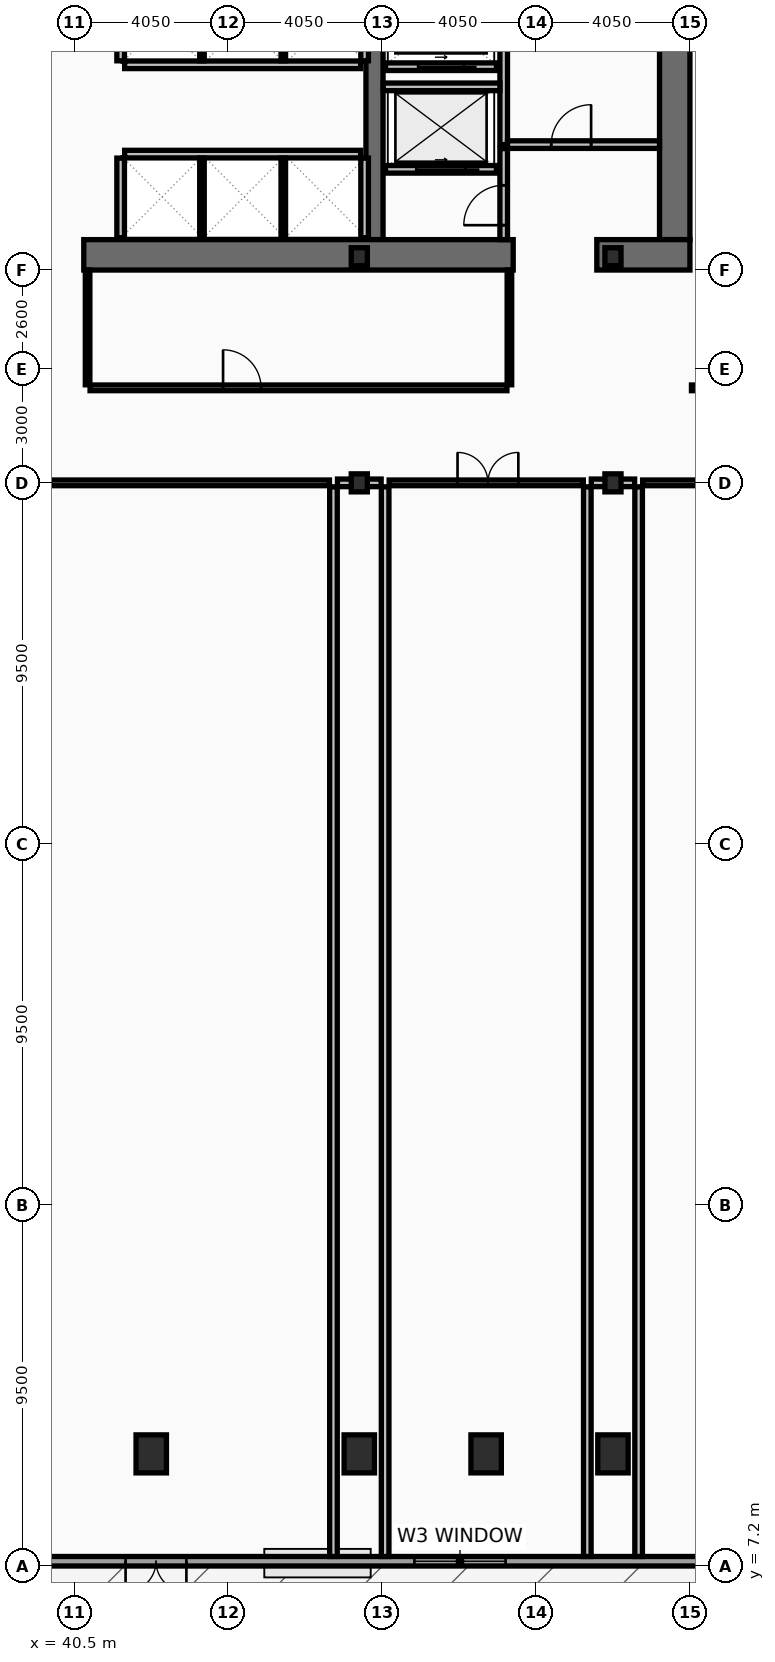
"""IFC4 building model, lengths in metres.
Left out: names, types, materials, properties, quantities, classifications, styles, units other than length and angle.
Written with IfcOpenShell. Run it as: python <this file> out.ifc"""

import sys

from ifc_helpers import new_model, si_unit, direction, frame, frame_2d, origin, origin_2d, place, context, subcontext, project, spatial, rectangle, hollow_rectangle, i_section, extrude, element, fill, save


model = new_model("IFC4")
c1 = context("Model", 3, precision=1e-05, world=origin(), true_north=direction((0.0, 1.0)))
c2 = subcontext(c1, "Body", "Model", "MODEL_VIEW")
j1 = project(units=[si_unit("LENGTHUNIT", "METRE"), si_unit("PLANEANGLEUNIT", "RADIAN")], contexts=[c1])
p1 = place(None, origin())
s1 = spatial("IfcSite", under=j1, at=p1, CompositionType="ELEMENT")
p2 = place(p1, origin())
s2 = spatial("IfcBuilding", under=s1, at=p2, CompositionType="ELEMENT")
p3 = place(p2, frame((0.0, 0.0, 20.4)))
s3 = spatial("IfcBuildingStorey", under=s2, at=p3, CompositionType="ELEMENT", Elevation=20.4)
p4 = place(p3, frame((56.3, 52.9, 0.0), z_axis=(0.0, 0.0, 1.0), x_axis=(0.0, -1.0, 0.0)))
e1 = element("IfcWall", 1, at=p4, inside=s3, PredefinedType="SHEAR", context=c2, shape_type="SweptSolid", body=[
    extrude(rectangle(XDim=10.8, YDim=0.8, at=frame_2d((5.4, 0.0))), origin(), (0.0, 0.0, 1.0), 5.22),
])
p5 = place(p3, frame((48.4, 42.1, 0.0), z_axis=(0.0, 0.0, 1.0), x_axis=(0.0, 1.0, 0.0)))
e2 = element("IfcWall", 2, at=p5, inside=s3, PredefinedType="SHEAR", context=c2, shape_type="SweptSolid", body=[
    extrude(rectangle(XDim=10.8, YDim=0.45, at=frame_2d((5.4, 0.0))), origin(), (0.0, 0.0, 1.0), 5.22),
])
p6 = place(p3, frame((52.05, 41.7, 0.0), z_axis=(0.0, 0.0, 1.0), x_axis=(-1.0, 0.0, 0.0)))
e3 = element("IfcWall", 3, at=p6, inside=s3, PredefinedType="SHEAR", context=c2, shape_type="SweptSolid", body=[
    extrude(rectangle(XDim=11.3, YDim=0.8, at=frame_2d((5.65, 0.0))), origin(), (0.0, 0.0, 1.0), 5.22),
])
p7 = place(p3, frame((56.7, 41.7, 0.0), z_axis=(0.0, 0.0, 1.0), x_axis=(-1.0, 0.0, 0.0)))
e4 = element("IfcWall", 4, at=p7, inside=s3, PredefinedType="SHEAR", context=c2, shape_type="SweptSolid", body=[
    extrude(rectangle(XDim=2.45, YDim=0.8, at=frame_2d((1.225, 0.0))), origin(), (0.0, 0.0, 1.0), 5.22),
])
for number, where, z_axis, x_axis in (
    (5, (42.525, 10.15, 0.0), (0.0, 0.0, 1.0), (1.0, 0.0, 0.0)),
    (6, (48.0, 10.15, 0.0), (0.0, 0.0, 1.0), (1.0, 0.0, 0.0)),
    (7, (51.337, 10.15, 0.0), (0.0, 0.0, 1.0), (1.0, 0.0, 0.0)),
    (8, (54.675, 10.15, 0.0), (0.0, 0.0, 1.0), (1.0, 0.0, 0.0)),
):
    element("IfcColumn", number, at=place(p3, frame(where, z_axis=z_axis, x_axis=x_axis)), inside=s3, PredefinedType="COLUMN", context=c2, shape_type="SweptSolid", body=[
        extrude(hollow_rectangle(XDim=0.8, YDim=1.0, WallThickness=0.055, at=origin_2d()), origin(), (0.0, 0.0, 1.0), 5.4),
    ])
for number, where, z_axis, x_axis in (
    (9, (48.0, 35.7, 0.0), (0.0, 0.0, 1.0), (1.0, 0.0, 0.0)),
    (10, (48.0, 41.65, 0.0), (0.0, 0.0, 1.0), (1.0, 0.0, 0.0)),
    (11, (54.675, 35.7, 0.0), (0.0, 0.0, 1.0), (1.0, 0.0, 0.0)),
    (12, (54.675, 41.65, 0.0), (0.0, 0.0, 1.0), (1.0, 0.0, 0.0)),
):
    element("IfcColumn", number, at=place(p3, frame(where, z_axis=z_axis, x_axis=x_axis)), inside=s3, PredefinedType="COLUMN", context=c2, shape_type="SweptSolid", body=[
        extrude(i_section(OverallWidth=0.424, OverallDepth=0.474, WebThickness=0.048, FlangeThickness=0.077, at=origin_2d()), origin(), (0.0, 0.0, 1.0), 5.4),
    ])
p8 = place(p3, frame((72.9, 7.325, 0.0), z_axis=(0.0, 0.0, 1.0), x_axis=(-1.0, 0.0, 0.0)))
e13 = element("IfcWall", 13, at=p8, inside=s3, PredefinedType="SOLIDWALL", context=c2, shape_type="SweptSolid", body=[
    extrude(rectangle(XDim=72.9, YDim=0.25, at=frame_2d((36.45, 0.0))), origin(), (0.0, 0.0, 1.0), 4.56),
])
p9 = place(p8, frame((10.45, 0.0, 0.0)))
e14 = element("IfcOpeningElement", 14, at=p9, cuts=e13, PredefinedType="OPENING", context=c2, shape_type="SweptSolid", body=[
    extrude(rectangle(XDim=1.6, YDim=2.2, at=frame_2d((0.8, 1.1))), frame((0.0, 0.135, 0.0), z_axis=(0.0, -1.0, 0.0), x_axis=(1.0, 0.0, 0.0)), (0.0, 0.0, 1.0), 0.27),
])
p10 = place(p8, frame((29.45, 0.0, 0.0)))
e15 = element("IfcOpeningElement", 15, at=p10, cuts=e13, PredefinedType="OPENING", context=c2, shape_type="SweptSolid", body=[
    extrude(rectangle(XDim=1.6, YDim=2.2, at=frame_2d((0.8, 1.1))), frame((0.0, 0.135, 0.0), z_axis=(0.0, -1.0, 0.0), x_axis=(1.0, 0.0, 0.0)), (0.0, 0.0, 1.0), 0.27),
])
p11 = place(p8, frame((60.65, 0.0, 0.0)))
e16 = element("IfcOpeningElement", 16, at=p11, cuts=e13, PredefinedType="OPENING", context=c2, shape_type="SweptSolid", body=[
    extrude(rectangle(XDim=1.05, YDim=2.15, at=frame_2d((0.525, 1.075))), frame((0.0, 0.135, 0.0), z_axis=(0.0, -1.0, 0.0), x_axis=(1.0, 0.0, 0.0)), (0.0, 0.0, 1.0), 0.27),
])
p12 = place(p8, frame((21.05, 0.0, 0.85)))
e17 = element("IfcOpeningElement", 17, at=p12, cuts=e13, PredefinedType="OPENING", context=c2, shape_type="SweptSolid", body=[
    extrude(rectangle(XDim=2.4, YDim=2.6, at=frame_2d((1.2, 1.3))), frame((0.0, 0.135, 0.0), z_axis=(0.0, -1.0, 0.0), x_axis=(1.0, 0.0, 0.0)), (0.0, 0.0, 1.0), 0.27),
])
p13 = place(p8, frame((49.65, 0.0, 0.85)))
e18 = element("IfcOpeningElement", 18, at=p13, cuts=e13, PredefinedType="OPENING", context=c2, shape_type="SweptSolid", body=[
    extrude(rectangle(XDim=2.4, YDim=2.6, at=frame_2d((1.2, 1.3))), frame((0.0, 0.135, 0.0), z_axis=(0.0, -1.0, 0.0), x_axis=(1.0, 0.0, 0.0)), (0.0, 0.0, 1.0), 0.27),
])
p14 = place(p3, frame((51.61, 43.95, 0.0), z_axis=(0.0, 0.0, 1.0), x_axis=(-1.0, 0.0, 0.0)))
e19 = element("IfcWall", 19, at=p14, inside=s3, PredefinedType="PARTITIONING", context=c2, shape_type="SweptSolid", body=[
    extrude(rectangle(XDim=2.92, YDim=0.2, at=frame_2d((1.46, 0.0))), origin(), (0.0, 0.0, 1.0), 5.22),
])
p15 = place(p14, frame((0.81, 0.0, 0.0)))
e20 = element("IfcOpeningElement", 20, at=p15, cuts=e19, PredefinedType="OPENING", context=c2, shape_type="SweptSolid", body=[
    extrude(rectangle(XDim=1.3, YDim=2.18, at=frame_2d((0.65, 1.09))), frame((0.0, 0.11, 0.0), z_axis=(0.0, -1.0, 0.0), x_axis=(1.0, 0.0, 0.0)), (0.0, 0.0, 1.0), 0.22),
])
p16 = place(p3, frame((51.61, 46.65, 0.0), z_axis=(0.0, 0.0, 1.0), x_axis=(-1.0, 0.0, 0.0)))
e21 = element("IfcWall", 21, at=p16, inside=s3, PredefinedType="PARTITIONING", context=c2, shape_type="SweptSolid", body=[
    extrude(rectangle(XDim=2.92, YDim=0.2, at=frame_2d((1.46, 0.0))), origin(), (0.0, 0.0, 1.0), 5.22),
])
p17 = place(p16, frame((0.86, 0.0, 0.0)))
e22 = element("IfcOpeningElement", 22, at=p17, cuts=e21, PredefinedType="OPENING", context=c2, shape_type="SweptSolid", body=[
    extrude(rectangle(XDim=1.2, YDim=2.18, at=frame_2d((0.6, 1.09))), frame((0.0, 0.11, 0.0), z_axis=(0.0, -1.0, 0.0), x_axis=(1.0, 0.0, 0.0)), (0.0, 0.0, 1.0), 0.22),
])
p18 = place(p3, frame((51.8, 44.6, 0.0), z_axis=(0.0, 0.0, 1.0), x_axis=(0.0, 1.0, 0.0)))
e23 = element("IfcWall", 23, at=p18, inside=s3, PredefinedType="PARTITIONING", context=c2, shape_type="SweptSolid", body=[
    extrude(rectangle(XDim=4.3, YDim=0.2, at=frame_2d((2.15, 0.0))), origin(), (0.0, 0.0, 1.0), 5.22),
])
p19 = place(p3, frame((51.9, 44.6, 0.0), z_axis=(0.0, 0.0, 1.0), x_axis=(1.0, 0.0, 0.0)))
e24 = element("IfcWall", 24, at=p19, inside=s3, PredefinedType="PARTITIONING", context=c2, shape_type="SweptSolid", body=[
    extrude(rectangle(XDim=4.0, YDim=0.2, at=frame_2d((2.0, 0.0))), origin(), (0.0, 0.0, 1.0), 5.22),
])
p20 = place(p19, frame((1.15, 0.0, 0.0)))
e25 = element("IfcOpeningElement", 25, at=p20, cuts=e24, PredefinedType="OPENING", context=c2, shape_type="SweptSolid", body=[
    extrude(rectangle(XDim=1.05, YDim=2.15, at=frame_2d((0.525, 1.075))), frame((0.0, 0.11, 0.0), z_axis=(0.0, -1.0, 0.0), x_axis=(1.0, 0.0, 0.0)), (0.0, 0.0, 1.0), 0.22),
])
p21 = place(p3, frame((48.63, 46.12, 0.0), z_axis=(0.0, 0.0, 1.0), x_axis=(1.0, 0.0, 0.0)))
e26 = element("IfcWall", 26, at=p21, inside=s3, PredefinedType="PARTITIONING", context=c2, shape_type="SweptSolid", body=[
    extrude(rectangle(XDim=3.07, YDim=0.2, at=frame_2d((1.535, 0.0))), origin(), (0.0, 0.0, 1.0), 5.22),
])
p22 = place(p3, frame((51.8, 42.1, 0.0), z_axis=(0.0, 0.0, 1.0), x_axis=(0.0, 1.0, 0.0)))
e27 = element("IfcWall", 27, at=p22, inside=s3, PredefinedType="PARTITIONING", context=c2, shape_type="SweptSolid", body=[
    extrude(rectangle(XDim=2.395, YDim=0.2, at=frame_2d((1.198, 0.0))), origin(), (0.0, 0.0, 1.0), 5.22),
])
p23 = place(p22, frame((0.38, 0.0, 0.0)))
e28 = element("IfcOpeningElement", 28, at=p23, cuts=e27, PredefinedType="OPENING", context=c2, shape_type="SweptSolid", body=[
    extrude(rectangle(XDim=1.05, YDim=2.15, at=frame_2d((0.525, 1.075))), frame((0.0, 0.11, 0.0), z_axis=(0.0, -1.0, 0.0), x_axis=(1.0, 0.0, 0.0)), (0.0, 0.0, 1.0), 0.22),
])
p24 = place(p3, frame((41.825, 46.7, 0.0), z_axis=(0.0, 0.0, 1.0), x_axis=(1.0, 0.0, 0.0)))
e29 = element("IfcWall", 29, at=p24, inside=s3, PredefinedType="PARTITIONING", context=c2, shape_type="SweptSolid", body=[
    extrude(rectangle(XDim=6.21, YDim=0.2, at=frame_2d((3.105, 0.0))), origin(), (0.0, 0.0, 1.0), 5.22),
])
for number, where, z_axis, x_axis in (
    (30, (41.72, 46.805, 0.0), (0.0, 0.0, 1.0), (0.0, 1.0, 0.0)),
    (31, (48.14, 46.805, 0.0), (0.0, 0.0, 1.0), (0.0, 1.0, 0.0)),
):
    element("IfcWall", number, at=place(p3, frame(where, z_axis=z_axis, x_axis=x_axis)), inside=s3, PredefinedType="PARTITIONING", context=c2, shape_type="SweptSolid", body=[
        extrude(rectangle(XDim=2.09, YDim=0.2, at=frame_2d((1.045, 0.0))), origin(), (0.0, 0.0, 1.0), 5.22),
    ])
for number, where, z_axis, x_axis in (
    (32, (43.86, 46.805, 0.0), (0.0, 0.0, 1.0), (0.0, 1.0, 0.0)),
    (33, (46.0, 46.805, 0.0), (0.0, 0.0, 1.0), (0.0, 1.0, 0.0)),
):
    element("IfcWall", number, at=place(p3, frame(where, z_axis=z_axis, x_axis=x_axis)), inside=s3, PredefinedType="PARTITIONING", context=c2, shape_type="SweptSolid", body=[
        extrude(rectangle(XDim=2.09, YDim=0.12, at=frame_2d((1.045, 0.0))), origin(), (0.0, 0.0, 1.0), 5.22),
    ])
p25 = place(p3, frame((41.825, 44.35, 0.0), z_axis=(0.0, 0.0, 1.0), x_axis=(1.0, 0.0, 0.0)))
e34 = element("IfcWall", 34, at=p25, inside=s3, PredefinedType="PARTITIONING", context=c2, shape_type="SweptSolid", body=[
    extrude(rectangle(XDim=6.21, YDim=0.2, at=frame_2d((3.105, 0.0))), origin(), (0.0, 0.0, 1.0), 5.22),
])
for number, where, z_axis, x_axis in (
    (35, (41.72, 42.15, 0.0), (0.0, 0.0, 1.0), (0.0, 1.0, 0.0)),
    (36, (48.14, 42.15, 0.0), (0.0, 0.0, 1.0), (0.0, 1.0, 0.0)),
):
    element("IfcWall", number, at=place(p3, frame(where, z_axis=z_axis, x_axis=x_axis)), inside=s3, PredefinedType="PARTITIONING", context=c2, shape_type="SweptSolid", body=[
        extrude(rectangle(XDim=2.095, YDim=0.2, at=frame_2d((1.048, 0.0))), origin(), (0.0, 0.0, 1.0), 5.22),
    ])
for number, where, z_axis, x_axis in (
    (37, (43.86, 42.15, 0.0), (0.0, 0.0, 1.0), (0.0, 1.0, 0.0)),
    (38, (46.0, 42.15, 0.0), (0.0, 0.0, 1.0), (0.0, 1.0, 0.0)),
):
    element("IfcWall", number, at=place(p3, frame(where, z_axis=z_axis, x_axis=x_axis)), inside=s3, PredefinedType="PARTITIONING", context=c2, shape_type="SweptSolid", body=[
        extrude(rectangle(XDim=2.095, YDim=0.12, at=frame_2d((1.048, 0.0))), origin(), (0.0, 0.0, 1.0), 5.22),
    ])
p26 = place(p3, frame((25.685, 35.7, 0.0), z_axis=(0.0, 0.0, 1.0), x_axis=(1.0, 0.0, 0.0)))
e39 = element("IfcWall", 39, at=p26, inside=s3, PredefinedType="PARTITIONING", context=c2, shape_type="SweptSolid", body=[
    extrude(rectangle(XDim=21.53, YDim=0.15, at=frame_2d((10.765, 0.0))), origin(), (0.0, 0.0, 1.0), 4.41),
])
p27 = place(p26, frame((9.8, 0.0, 0.0)))
e40 = element("IfcOpeningElement", 40, at=p27, cuts=e39, PredefinedType="OPENING", context=c2, shape_type="SweptSolid", body=[
    extrude(rectangle(XDim=1.6, YDim=2.15, at=frame_2d((0.8, 1.075))), frame((0.0, 0.085, 0.0), z_axis=(0.0, -1.0, 0.0), x_axis=(1.0, 0.0, 0.0)), (0.0, 0.0, 1.0), 0.17),
])
p28 = place(p3, frame((47.425, 35.7, 0.0), z_axis=(0.0, 0.0, 1.0), x_axis=(1.0, 0.0, 0.0)))
e41 = element("IfcWall", 41, at=p28, inside=s3, PredefinedType="PARTITIONING", context=c2, shape_type="SweptSolid", body=[
    extrude(rectangle(XDim=1.15, YDim=0.2, at=frame_2d((0.575, 0.0))), origin(), (0.0, 0.0, 1.0), 2.21),
])
p29 = place(p3, frame((48.785, 35.7, 0.0), z_axis=(0.0, 0.0, 1.0), x_axis=(1.0, 0.0, 0.0)))
e42 = element("IfcWall", 42, at=p29, inside=s3, PredefinedType="PARTITIONING", context=c2, shape_type="SweptSolid", body=[
    extrude(rectangle(XDim=5.11, YDim=0.15, at=frame_2d((2.555, 0.0))), origin(), (0.0, 0.0, 1.0), 4.61),
])
p30 = place(p29, frame((1.8, 0.0, 0.0)))
e43 = element("IfcOpeningElement", 43, at=p30, cuts=e42, PredefinedType="OPENING", context=c2, shape_type="SweptSolid", body=[
    extrude(rectangle(XDim=1.6, YDim=2.15, at=frame_2d((0.8, 1.075))), frame((0.0, 0.085, 0.0), z_axis=(0.0, -1.0, 0.0), x_axis=(1.0, 0.0, 0.0)), (0.0, 0.0, 1.0), 0.17),
])
p31 = place(p3, frame((54.105, 35.7, 0.0), z_axis=(0.0, 0.0, 1.0), x_axis=(1.0, 0.0, 0.0)))
e44 = element("IfcWall", 44, at=p31, inside=s3, PredefinedType="PARTITIONING", context=c2, shape_type="SweptSolid", body=[
    extrude(rectangle(XDim=1.14, YDim=0.2, at=frame_2d((0.57, 0.0))), origin(), (0.0, 0.0, 1.0), 2.21),
])
p32 = place(p3, frame((55.455, 35.7, 0.0), z_axis=(0.0, 0.0, 1.0), x_axis=(1.0, 0.0, 0.0)))
e45 = element("IfcWall", 45, at=p32, inside=s3, PredefinedType="PARTITIONING", context=c2, shape_type="SweptSolid", body=[
    extrude(rectangle(XDim=17.265, YDim=0.15, at=frame_2d((8.632, 0.0))), origin(), (0.0, 0.0, 1.0), 4.41),
])
p33 = place(p32, frame((6.5, 0.0, 0.0)))
e46 = element("IfcOpeningElement", 46, at=p33, cuts=e45, PredefinedType="OPENING", context=c2, shape_type="SweptSolid", body=[
    extrude(rectangle(XDim=1.0, YDim=2.05, at=frame_2d((0.5, 1.025))), frame((0.0, 0.085, 0.0), z_axis=(0.0, -1.0, 0.0), x_axis=(1.0, 0.0, 0.0)), (0.0, 0.0, 1.0), 0.17),
])
for number, where, z_axis, x_axis in (
    (47, (47.32, 7.45, 0.0), (0.0, 0.0, 1.0), (0.0, 1.0, 0.0)),
    (48, (48.68, 7.45, 0.0), (0.0, 0.0, 1.0), (0.0, 1.0, 0.0)),
    (49, (54.0, 7.45, 0.0), (0.0, 0.0, 1.0), (0.0, 1.0, 0.0)),
):
    element("IfcWall", number, at=place(p3, frame(where, z_axis=z_axis, x_axis=x_axis)), inside=s3, PredefinedType="PARTITIONING", context=c2, shape_type="SweptSolid", body=[
        extrude(rectangle(XDim=28.145, YDim=0.2, at=frame_2d((14.073, 0.0))), origin(), (0.0, 0.0, 1.0), 4.56),
    ])
p34 = place(p3, frame((55.35, 7.45, 0.0), z_axis=(0.0, 0.0, 1.0), x_axis=(0.0, 1.0, 0.0)))
e50 = element("IfcWall", 50, at=p34, inside=s3, PredefinedType="PARTITIONING", context=c2, shape_type="SweptSolid", body=[
    extrude(rectangle(XDim=28.145, YDim=0.2, at=frame_2d((14.073, 0.0))), origin(), (0.0, 0.0, 1.0), 3.89),
])
p35 = place(p3, frame((56.74, 38.2, 0.0), z_axis=(0.0, 0.0, 1.0), x_axis=(1.0, 0.0, 0.0)))
e51 = element("IfcWall", 51, at=p35, inside=s3, PredefinedType="PARTITIONING", context=c2, shape_type="SweptSolid", body=[
    extrude(rectangle(XDim=15.98, YDim=0.15, at=frame_2d((7.99, 0.0))), origin(), (0.0, 0.0, 1.0), 4.56),
])
p36 = place(p35, frame((4.2, 0.0, 0.0)))
e52 = element("IfcOpeningElement", 52, at=p36, cuts=e51, PredefinedType="OPENING", context=c2, shape_type="SweptSolid", body=[
    extrude(rectangle(XDim=0.95, YDim=2.1, at=frame_2d((0.475, 1.05))), frame((0.0, 0.085, 0.0), z_axis=(0.0, -1.0, 0.0), x_axis=(1.0, 0.0, 0.0)), (0.0, 0.0, 1.0), 0.17),
])
for number, where, z_axis, x_axis in (
    (53, (40.85, 38.28, 0.0), (0.0, 0.0, 1.0), (0.0, 1.0, 0.0)),
    (54, (51.95, 38.28, 0.0), (0.0, 0.0, 1.0), (0.0, 1.0, 0.0)),
):
    element("IfcWall", number, at=place(p3, frame(where, z_axis=z_axis, x_axis=x_axis)), inside=s3, PredefinedType="PARTITIONING", context=c2, shape_type="SweptSolid", body=[
        extrude(rectangle(XDim=3.02, YDim=0.12, at=frame_2d((1.51, 0.0))), origin(), (0.0, 0.0, 1.0), 5.22),
    ])
p37 = place(p3, frame((40.915, 38.2, 0.0), z_axis=(0.0, 0.0, 1.0), x_axis=(1.0, 0.0, 0.0)))
e55 = element("IfcWall", 55, at=p37, inside=s3, PredefinedType="PARTITIONING", context=c2, shape_type="SweptSolid", body=[
    extrude(rectangle(XDim=10.97, YDim=0.15, at=frame_2d((5.485, 0.0))), origin(), (0.0, 0.0, 1.0), 4.41),
])
p38 = place(p37, frame((3.5, 0.0, 0.0)))
e56 = element("IfcOpeningElement", 56, at=p38, cuts=e55, PredefinedType="OPENING", context=c2, shape_type="SweptSolid", body=[
    extrude(rectangle(XDim=1.0, YDim=2.05, at=frame_2d((0.5, 1.025))), frame((0.0, 0.085, 0.0), z_axis=(0.0, -1.0, 0.0), x_axis=(1.0, 0.0, 0.0)), (0.0, 0.0, 1.0), 0.17),
])
p39 = place(p10, origin())
e57 = element("IfcDoor", 57, at=p39, inside=s3, OperationType="DOUBLE_DOOR_SINGLE_SWING", PredefinedType="DOOR", context=c2, shape_type="SweptSolid", body=[
    extrude(rectangle(XDim=1.6, YDim=2.2, at=frame_2d((0.8, 1.1))), frame((0.0, 0.025, 0.0), z_axis=(0.0, -1.0, 0.0), x_axis=(1.0, 0.0, 0.0)), (0.0, 0.0, 1.0), 0.05),
])
fill(e15, e57)
p40 = place(p12, origin())
e58 = element("IfcWindow", 58, at=p40, inside=s3, PartitioningType="SINGLE_PANEL", PredefinedType="WINDOW", context=c2, shape_type="SweptSolid", body=[
    extrude(rectangle(XDim=2.4, YDim=2.6, at=frame_2d((1.2, 1.3))), frame((0.0, 0.03, 0.0), z_axis=(0.0, -1.0, 0.0), x_axis=(1.0, 0.0, 0.0)), (0.0, 0.0, 1.0), 0.06),
])
fill(e17, e58)
p41 = place(p15, origin())
e59 = element("IfcDoor", 59, at=p41, inside=s3, OperationType="SLIDING_TO_LEFT", PredefinedType="DOOR", context=c2, shape_type="SweptSolid", body=[
    extrude(rectangle(XDim=1.3, YDim=2.18, at=frame_2d((0.65, 1.09))), frame((0.0, 0.025, 0.0), z_axis=(0.0, -1.0, 0.0), x_axis=(1.0, 0.0, 0.0)), (0.0, 0.0, 1.0), 0.05),
])
fill(e20, e59)
p42 = place(p17, origin())
e60 = element("IfcDoor", 60, at=p42, inside=s3, OperationType="SLIDING_TO_LEFT", PredefinedType="DOOR", context=c2, shape_type="SweptSolid", body=[
    extrude(rectangle(XDim=1.2, YDim=2.18, at=frame_2d((0.6, 1.09))), frame((0.0, 0.025, 0.0), z_axis=(0.0, -1.0, 0.0), x_axis=(1.0, 0.0, 0.0)), (0.0, 0.0, 1.0), 0.05),
])
fill(e22, e60)
p43 = place(p20, origin())
e61 = element("IfcDoor", 61, at=p43, inside=s3, OperationType="SINGLE_SWING_RIGHT", PredefinedType="DOOR", context=c2, shape_type="SweptSolid", body=[
    extrude(rectangle(XDim=1.05, YDim=2.15, at=frame_2d((0.525, 1.075))), frame((0.0, 0.025, 0.0), z_axis=(0.0, -1.0, 0.0), x_axis=(1.0, 0.0, 0.0)), (0.0, 0.0, 1.0), 0.05),
])
fill(e25, e61)
p44 = place(p23, origin())
e62 = element("IfcDoor", 62, at=p44, inside=s3, OperationType="SINGLE_SWING_LEFT", PredefinedType="DOOR", context=c2, shape_type="SweptSolid", body=[
    extrude(rectangle(XDim=1.05, YDim=2.15, at=frame_2d((0.525, 1.075))), frame((0.0, 0.025, 0.0), z_axis=(0.0, -1.0, 0.0), x_axis=(1.0, 0.0, 0.0)), (0.0, 0.0, 1.0), 0.05),
])
fill(e28, e62)
p45 = place(p30, origin())
e63 = element("IfcDoor", 63, at=p45, inside=s3, OperationType="DOUBLE_DOOR_SINGLE_SWING", PredefinedType="DOOR", context=c2, shape_type="SweptSolid", body=[
    extrude(rectangle(XDim=1.6, YDim=2.15, at=frame_2d((0.8, 1.075))), frame((0.0, 0.025, 0.0), z_axis=(0.0, -1.0, 0.0), x_axis=(1.0, 0.0, 0.0)), (0.0, 0.0, 1.0), 0.05),
])
fill(e43, e63)
p46 = place(p38, origin())
e64 = element("IfcDoor", 64, at=p46, inside=s3, OperationType="SINGLE_SWING_LEFT", PredefinedType="DOOR", context=c2, shape_type="SweptSolid", body=[
    extrude(rectangle(XDim=1.0, YDim=2.05, at=frame_2d((0.5, 1.025))), frame((0.0, 0.025, 0.0), z_axis=(0.0, -1.0, 0.0), x_axis=(1.0, 0.0, 0.0)), (0.0, 0.0, 1.0), 0.05),
])
fill(e56, e64)
save(model, sys.argv[1])
